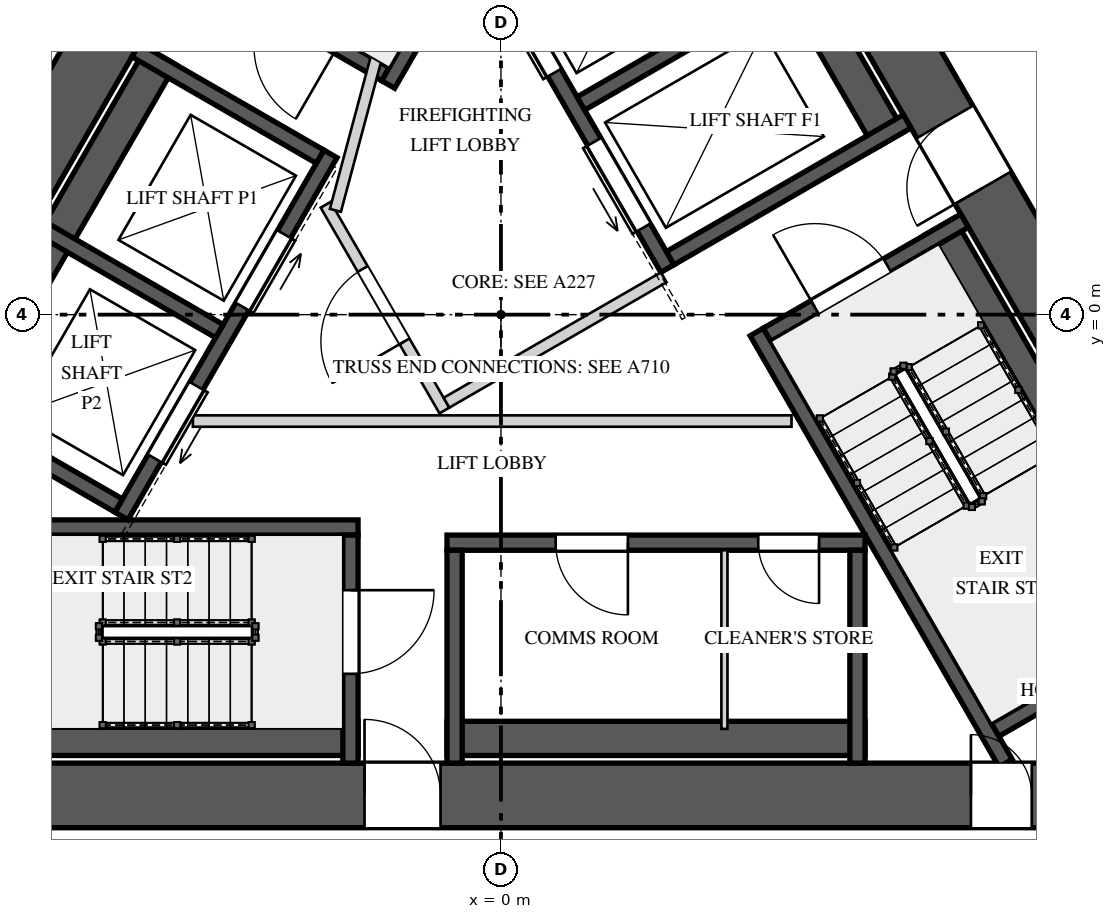
"""IFC4 building model, lengths in metres.
Left out: names, types, materials, properties, quantities, classifications, styles, units other than length and angle.
Written with IfcOpenShell. Run it as: python <this file> out.ifc"""

import sys

from ifc_helpers import new_model, si_unit, direction, frame, frame_2d, origin, place, context, subcontext, project, spatial, rectangle, extrude, element, fill, save


model = new_model("IFC4")
c1 = context("Model", 3, precision=1e-05, world=origin(), true_north=direction((0.0, 1.0)))
c2 = subcontext(c1, "Body", "Model", "MODEL_VIEW")
j1 = project(units=[si_unit("LENGTHUNIT", "METRE"), si_unit("PLANEANGLEUNIT", "RADIAN")], contexts=[c1])
p1 = place(None, origin())
s1 = spatial("IfcSite", under=j1, at=p1, CompositionType="ELEMENT")
p2 = place(p1, origin())
s2 = spatial("IfcBuilding", under=s1, at=p2, CompositionType="ELEMENT")
p3 = place(p2, frame((0.0, 0.0, 194.8)))
s3 = spatial("IfcBuildingStorey", under=s2, at=p3, CompositionType="ELEMENT", Elevation=194.8)
p4 = place(p3, frame((-1.198, 10.575, 0.0), z_axis=(0.0, 0.0, 1.0), x_axis=(-0.499995289315, -0.866028123483, 0.0)))
e1 = element("IfcWall", 1, at=p4, inside=s3, PredefinedType="SHEAR", context=c2, shape_type="SweptSolid", body=[
    extrude(rectangle(XDim=17.118, YDim=0.85, at=frame_2d((8.559, 0.0))), origin(), (0.0, 0.0, 1.0), 5.2),
])
p5 = place(p4, frame((6.764, 0.0, 0.0)))
e2 = element("IfcOpeningElement", 2, at=p5, cuts=e1, PredefinedType="OPENING", context=c2, shape_type="SweptSolid", body=[
    extrude(rectangle(XDim=1.0, YDim=2.4, at=frame_2d((0.5, 1.2))), frame((0.0, 0.435, 0.0), z_axis=(0.0, -1.0, 0.0), x_axis=(1.0, 0.0, 0.0)), (0.0, 0.0, 1.0), 0.87),
])
p6 = place(p3, frame((-8.559, -6.325, 0.0), z_axis=(0.0, 0.0, 1.0), x_axis=(1.0, 0.0, 0.0)))
e3 = element("IfcWall", 3, at=p6, inside=s3, PredefinedType="SHEAR", context=c2, shape_type="SweptSolid", body=[
    extrude(rectangle(XDim=17.118, YDim=0.85, at=frame_2d((8.559, 0.0))), origin(), (0.0, 0.0, 1.0), 5.2),
])
p7 = place(p6, frame((6.764, 0.0, 0.0)))
e4 = element("IfcOpeningElement", 4, at=p7, cuts=e3, PredefinedType="OPENING", context=c2, shape_type="SweptSolid", body=[
    extrude(rectangle(XDim=1.0, YDim=2.4, at=frame_2d((0.5, 1.2))), frame((0.0, 0.435, 0.0), z_axis=(0.0, -1.0, 0.0), x_axis=(1.0, 0.0, 0.0)), (0.0, 0.0, 1.0), 0.87),
])
p8 = place(p6, frame((14.742, 0.0, 0.0)))
e5 = element("IfcOpeningElement", 5, at=p8, cuts=e3, PredefinedType="OPENING", context=c2, shape_type="SweptSolid", body=[
    extrude(rectangle(XDim=0.8, YDim=2.1, at=frame_2d((0.4, 1.05))), frame((0.0, 0.435, 0.0), z_axis=(0.0, -1.0, 0.0), x_axis=(1.0, 0.0, 0.0)), (0.0, 0.0, 1.0), 0.87),
])
p9 = place(p3, frame((9.757, -4.25, 0.0), z_axis=(0.0, 0.0, 1.0), x_axis=(-0.499995289315, 0.866028123483, 0.0)))
e6 = element("IfcWall", 6, at=p9, inside=s3, PredefinedType="SHEAR", context=c2, shape_type="SweptSolid", body=[
    extrude(rectangle(XDim=17.118, YDim=0.85, at=frame_2d((8.559, 0.0))), origin(), (0.0, 0.0, 1.0), 5.2),
])
p10 = place(p9, frame((6.834, 0.0, 0.0)))
e7 = element("IfcOpeningElement", 7, at=p10, cuts=e6, PredefinedType="OPENING", context=c2, shape_type="SweptSolid", body=[
    extrude(rectangle(XDim=1.0, YDim=2.4, at=frame_2d((0.5, 1.2))), frame((0.0, 0.435, 0.0), z_axis=(0.0, -1.0, 0.0), x_axis=(1.0, 0.0, 0.0)), (0.0, 0.0, 1.0), 0.87),
])
p11 = place(p9, frame((14.252, 0.0, 0.0)))
e8 = element("IfcOpeningElement", 8, at=p11, cuts=e6, PredefinedType="OPENING", context=c2, shape_type="SweptSolid", body=[
    extrude(rectangle(XDim=0.8, YDim=2.1, at=frame_2d((0.4, 1.05))), frame((0.0, 0.435, 0.0), z_axis=(0.0, -1.0, 0.0), x_axis=(1.0, 0.0, 0.0)), (0.0, 0.0, 1.0), 0.87),
])
p12 = place(p3, frame((1.79, 8.7, 0.0), z_axis=(0.0, 0.0, 1.0), x_axis=(-0.499999959354, -0.866025427251, 0.0)))
e9 = element("IfcWall", 9, at=p12, inside=s3, PredefinedType="SOLIDWALL", context=c2, shape_type="SweptSolid", body=[
    extrude(rectangle(XDim=6.549, YDim=0.2, at=frame_2d((3.275, 0.0))), origin(), (0.0, 0.0, 1.0), 4.85),
])
p13 = place(p3, frame((-1.521, 3.165, 0.0), z_axis=(0.0, 0.0, 1.0), x_axis=(-0.866031096941, 0.499990139034, 0.0)))
e10 = element("IfcWall", 10, at=p13, inside=s3, PredefinedType="SOLIDWALL", context=c2, shape_type="SweptSolid", body=[
    extrude(rectangle(XDim=3.0, YDim=0.2, at=frame_2d((1.5, 0.0))), origin(), (0.0, 0.0, 1.0), 4.85),
])
p14 = place(p13, frame((0.725, 0.0, 0.0)))
e11 = element("IfcOpeningElement", 11, at=p14, cuts=e10, PredefinedType="OPENING", context=c2, shape_type="SweptSolid", body=[
    extrude(rectangle(XDim=1.1, YDim=2.4, at=frame_2d((0.55, 1.2))), frame((0.0, 0.11, 0.0), z_axis=(0.0, -1.0, 0.0), x_axis=(1.0, 0.0, 0.0)), (0.0, 0.0, 1.0), 0.22),
])
p15 = place(p3, frame((-8.08, -5.575, 0.0), z_axis=(0.0, 0.0, 1.0), x_axis=(1.0, 0.0, 0.0)))
e12 = element("IfcWall", 12, at=p15, inside=s3, PredefinedType="SOLIDWALL", context=c2, shape_type="SweptSolid", body=[
    extrude(rectangle(XDim=6.2, YDim=0.45, at=frame_2d((3.1, 0.0))), origin(), (0.0, 0.0, 1.0), 4.85),
])
p16 = place(p3, frame((-8.429, -2.8, 0.0), z_axis=(0.0, 0.0, 1.0), x_axis=(1.0, 0.0, 0.0)))
e13 = element("IfcWall", 13, at=p16, inside=s3, PredefinedType="SOLIDWALL", context=c2, shape_type="SweptSolid", body=[
    extrude(rectangle(XDim=6.549, YDim=0.2, at=frame_2d((3.275, 0.0))), origin(), (0.0, 0.0, 1.0), 4.85),
])
p17 = place(p3, frame((-1.98, -2.9, 0.0), z_axis=(0.0, 0.0, 1.0), x_axis=(0.0, -1.0, 0.0)))
e14 = element("IfcWall", 14, at=p17, inside=s3, PredefinedType="SOLIDWALL", context=c2, shape_type="SweptSolid", body=[
    extrude(rectangle(XDim=3.0, YDim=0.2, at=frame_2d((1.5, 0.0))), origin(), (0.0, 0.0, 1.0), 4.85),
])
p18 = place(p17, frame((0.725, 0.0, 0.0)))
e15 = element("IfcOpeningElement", 15, at=p18, cuts=e14, PredefinedType="OPENING", context=c2, shape_type="SweptSolid", body=[
    extrude(rectangle(XDim=1.1, YDim=2.4, at=frame_2d((0.55, 1.2))), frame((0.0, 0.11, 0.0), z_axis=(0.0, -1.0, 0.0), x_axis=(1.0, 0.0, 0.0)), (0.0, 0.0, 1.0), 0.22),
])
p19 = place(p3, frame((8.868, -4.21, 0.0), z_axis=(0.0, 0.0, 1.0), x_axis=(-0.500009909098, 0.866019682689, 0.0)))
e16 = element("IfcWall", 16, at=p19, inside=s3, PredefinedType="SOLIDWALL", context=c2, shape_type="SweptSolid", body=[
    extrude(rectangle(XDim=6.2, YDim=0.45, at=frame_2d((3.1, 0.0))), origin(), (0.0, 0.0, 1.0), 4.85),
])
p20 = place(p3, frame((6.64, -5.9, 0.0), z_axis=(0.0, 0.0, 1.0), x_axis=(-0.499999959354, 0.866025427251, 0.0)))
e17 = element("IfcWall", 17, at=p20, inside=s3, PredefinedType="SOLIDWALL", context=c2, shape_type="SweptSolid", body=[
    extrude(rectangle(XDim=6.549, YDim=0.2, at=frame_2d((3.275, 0.0))), origin(), (0.0, 0.0, 1.0), 4.85),
])
p21 = place(p3, frame((6.501, -5.461, 0.0), z_axis=(0.0, 0.0, 1.0), x_axis=(0.866031096941, 0.499990139034, 0.0)))
e18 = element("IfcWall", 18, at=p21, inside=s3, PredefinedType="SOLIDWALL", context=c2, shape_type="SweptSolid", body=[
    extrude(rectangle(XDim=3.0, YDim=0.2, at=frame_2d((1.5, 0.0))), origin(), (0.0, 0.0, 1.0), 4.85),
])
p22 = place(p3, frame((3.501, -0.265, 0.0), z_axis=(0.0, 0.0, 1.0), x_axis=(0.866031096941, 0.499990139034, 0.0)))
e19 = element("IfcWall", 19, at=p22, inside=s3, PredefinedType="SOLIDWALL", context=c2, shape_type="SweptSolid", body=[
    extrude(rectangle(XDim=3.0, YDim=0.2, at=frame_2d((1.5, 0.0))), origin(), (0.0, 0.0, 1.0), 4.85),
])
p23 = place(p22, frame((0.725, 0.0, 0.0)))
e20 = element("IfcOpeningElement", 20, at=p23, cuts=e19, PredefinedType="OPENING", context=c2, shape_type="SweptSolid", body=[
    extrude(rectangle(XDim=1.1, YDim=2.4, at=frame_2d((0.55, 1.2))), frame((0.0, 0.11, 0.0), z_axis=(0.0, -1.0, 0.0), x_axis=(1.0, 0.0, 0.0)), (0.0, 0.0, 1.0), 0.22),
])
p24 = place(p3, frame((-2.243, 2.115, 0.0), z_axis=(0.0, 0.0, 1.0), x_axis=(-0.499996545922, -0.866027397988, 0.0)))
e21 = element("IfcWall", 21, at=p24, inside=s3, PredefinedType="SOLIDWALL", context=c2, shape_type="SweptSolid", body=[
    extrude(rectangle(XDim=5.5, YDim=0.2, at=frame_2d((2.75, 0.0))), origin(), (0.0, 0.0, 1.0), 4.85),
])
p25 = place(p24, frame((1.22, 0.0, 0.0)))
e22 = element("IfcOpeningElement", 22, at=p25, cuts=e21, PredefinedType="OPENING", context=c2, shape_type="SweptSolid", body=[
    extrude(rectangle(XDim=1.1, YDim=2.1, at=frame_2d((0.55, 1.05))), frame((0.0, 0.11, 0.0), z_axis=(0.0, -1.0, 0.0), x_axis=(1.0, 0.0, 0.0)), (0.0, 0.0, 1.0), 0.22),
])
p26 = place(p24, frame((3.525, 0.0, 0.0)))
e23 = element("IfcOpeningElement", 23, at=p26, cuts=e21, PredefinedType="OPENING", context=c2, shape_type="SweptSolid", body=[
    extrude(rectangle(XDim=1.1, YDim=2.1, at=frame_2d((0.55, 1.05))), frame((0.0, 0.11, 0.0), z_axis=(0.0, -1.0, 0.0), x_axis=(1.0, 0.0, 0.0)), (0.0, 0.0, 1.0), 0.22),
])
p27 = place(p3, frame((-4.473, 3.402, 0.0), z_axis=(0.0, 0.0, 1.0), x_axis=(-0.499996545922, -0.866027397988, 0.0)))
e24 = element("IfcWall", 24, at=p27, inside=s3, PredefinedType="SOLIDWALL", context=c2, shape_type="SweptSolid", body=[
    extrude(rectangle(XDim=5.5, YDim=0.45, at=frame_2d((2.75, 0.0))), origin(), (0.0, 0.0, 1.0), 4.85),
])
p28 = place(p3, frame((-2.38, 2.078, 0.0), z_axis=(0.0, 0.0, 1.0), x_axis=(-0.866034573852, 0.49998411664, 0.0)))
e25 = element("IfcWall", 25, at=p28, inside=s3, PredefinedType="SOLIDWALL", context=c2, shape_type="SweptSolid", body=[
    extrude(rectangle(XDim=2.8, YDim=0.2, at=frame_2d((1.4, 0.0))), origin(), (0.0, 0.0, 1.0), 4.85),
])
p29 = place(p3, frame((-3.705, -0.217, 0.0), z_axis=(0.0, 0.0, 1.0), x_axis=(-0.866018616679, 0.500011755427, 0.0)))
e26 = element("IfcWall", 26, at=p29, inside=s3, PredefinedType="SOLIDWALL", context=c2, shape_type="SweptSolid", body=[
    extrude(rectangle(XDim=2.8, YDim=0.2, at=frame_2d((1.4, 0.0))), origin(), (0.0, 0.0, 1.0), 4.85),
])
p30 = place(p3, frame((-5.03, -2.512, 0.0), z_axis=(0.0, 0.0, 1.0), x_axis=(-0.865996816683, 0.500049511043, 0.0)))
e27 = element("IfcWall", 27, at=p30, inside=s3, PredefinedType="SOLIDWALL", context=c2, shape_type="SweptSolid", body=[
    extrude(rectangle(XDim=2.8, YDim=0.2, at=frame_2d((1.4, 0.0))), origin(), (0.0, 0.0, 1.0), 4.85),
])
p31 = place(p3, frame((4.79, -3.0, 0.0), z_axis=(0.0, 0.0, 1.0), x_axis=(-1.0, 0.0, 0.0)))
e28 = element("IfcWall", 28, at=p31, inside=s3, PredefinedType="SOLIDWALL", context=c2, shape_type="SweptSolid", body=[
    extrude(rectangle(XDim=5.5, YDim=0.2, at=frame_2d((2.75, 0.0))), origin(), (0.0, 0.0, 1.0), 4.85),
])
p32 = place(p31, frame((3.12, 0.0, 0.0)))
e29 = element("IfcOpeningElement", 29, at=p32, cuts=e28, PredefinedType="OPENING", context=c2, shape_type="SweptSolid", body=[
    extrude(rectangle(XDim=0.95, YDim=2.4, at=frame_2d((0.475, 1.2))), frame((0.0, 0.11, 0.0), z_axis=(0.0, -1.0, 0.0), x_axis=(1.0, 0.0, 0.0)), (0.0, 0.0, 1.0), 0.22),
])
p33 = place(p31, frame((0.605, 0.0, 0.0)))
e30 = element("IfcOpeningElement", 30, at=p33, cuts=e28, PredefinedType="OPENING", context=c2, shape_type="SweptSolid", body=[
    extrude(rectangle(XDim=0.8, YDim=2.1, at=frame_2d((0.4, 1.05))), frame((0.0, 0.11, 0.0), z_axis=(0.0, -1.0, 0.0), x_axis=(1.0, 0.0, 0.0)), (0.0, 0.0, 1.0), 0.22),
])
p34 = place(p3, frame((-0.71, -5.575, 0.0), z_axis=(0.0, 0.0, 1.0), x_axis=(1.0, 0.0, 0.0)))
e31 = element("IfcWall", 31, at=p34, inside=s3, PredefinedType="SOLIDWALL", context=c2, shape_type="SweptSolid", body=[
    extrude(rectangle(XDim=5.5, YDim=0.45, at=frame_2d((2.75, 0.0))), origin(), (0.0, 0.0, 1.0), 4.85),
])
for number, where, z_axis, x_axis in (
    (32, (-0.61, -3.1, 0.0), (0.0, 0.0, 1.0), (0.0, -1.0, 0.0)),
    (33, (4.69, -3.1, 0.0), (0.0, 0.0, 1.0), (0.0, -1.0, 0.0)),
):
    element("IfcWall", number, at=place(p3, frame(where, z_axis=z_axis, x_axis=x_axis)), inside=s3, PredefinedType="SOLIDWALL", context=c2, shape_type="SweptSolid", body=[
        extrude(rectangle(XDim=2.8, YDim=0.2, at=frame_2d((1.4, 0.0))), origin(), (0.0, 0.0, 1.0), 4.85),
    ])
p35 = place(p3, frame((2.94, -3.1, 0.0), z_axis=(0.0, 0.0, 1.0), x_axis=(0.0, -1.0, 0.0)))
e34 = element("IfcWall", 34, at=p35, inside=s3, PredefinedType="PARTITIONING", context=c2, shape_type="SweptSolid", body=[
    extrude(rectangle(XDim=2.35, YDim=0.08, at=frame_2d((1.175, 0.0))), origin(), (0.0, 0.0, 1.0), 4.85),
])
p36 = place(p3, frame((2.19, 0.606, 0.0), z_axis=(0.0, 0.0, 1.0), x_axis=(-0.500002801628, 0.866023786258, 0.0)))
e35 = element("IfcWall", 35, at=p36, inside=s3, PredefinedType="SOLIDWALL", context=c2, shape_type="SweptSolid", body=[
    extrude(rectangle(XDim=4.9, YDim=0.2, at=frame_2d((2.45, 0.0))), origin(), (0.0, 0.0, 1.0), 4.85),
])
p37 = place(p36, frame((0.625, 0.0, 0.0)))
e36 = element("IfcOpeningElement", 36, at=p37, cuts=e35, PredefinedType="OPENING", context=c2, shape_type="SweptSolid", body=[
    extrude(rectangle(XDim=1.3, YDim=2.1, at=frame_2d((0.65, 1.05))), frame((0.0, 0.11, 0.0), z_axis=(0.0, -1.0, 0.0), x_axis=(1.0, 0.0, 0.0)), (0.0, 0.0, 1.0), 0.22),
])
p38 = place(p36, frame((2.975, 0.0, 0.0)))
e37 = element("IfcOpeningElement", 37, at=p38, cuts=e35, PredefinedType="OPENING", context=c2, shape_type="SweptSolid", body=[
    extrude(rectangle(XDim=1.3, YDim=2.1, at=frame_2d((0.65, 1.05))), frame((0.0, 0.11, 0.0), z_axis=(0.0, -1.0, 0.0), x_axis=(1.0, 0.0, 0.0)), (0.0, 0.0, 1.0), 0.22),
])
p39 = place(p3, frame((5.113, 2.294, 0.0), z_axis=(0.0, 0.0, 1.0), x_axis=(-0.500002801628, 0.866023786258, 0.0)))
e38 = element("IfcWall", 38, at=p39, inside=s3, PredefinedType="SOLIDWALL", context=c2, shape_type="SweptSolid", body=[
    extrude(rectangle(XDim=4.9, YDim=0.45, at=frame_2d((2.45, 0.0))), origin(), (0.0, 0.0, 1.0), 4.85),
])
for number, where, z_axis, x_axis in (
    (39, (2.227, 0.743, 0.0), (0.0, 0.0, 1.0), (0.866, 0.5, 0.0)),
    (40, (1.052, 2.778, 0.0), (0.0, 0.0, 1.0), (0.866, 0.5, 0.0)),
):
    element("IfcWall", number, at=place(p3, frame(where, z_axis=z_axis, x_axis=x_axis)), inside=s3, PredefinedType="SOLIDWALL", context=c2, shape_type="SweptSolid", body=[
        extrude(rectangle(XDim=3.6, YDim=0.2, at=frame_2d((1.8, 0.0))), origin(), (0.0, 0.0, 1.0), 4.85),
    ])
p40 = place(p3, frame((-0.744, -1.261, 0.0), z_axis=(0.0, 0.0, 1.0), x_axis=(-0.500004234368, 0.866022959057, 0.0)))
e41 = element("IfcWall", 41, at=p40, inside=s3, PredefinedType="PARTITIONING", context=c2, shape_type="SweptSolid", body=[
    extrude(rectangle(XDim=3.125, YDim=0.15, at=frame_2d((1.562, 0.0))), origin(), (0.0, 0.0, 1.0), 4.85),
])
p41 = place(p40, frame((1.05, 0.0, 0.0)))
e42 = element("IfcOpeningElement", 42, at=p41, cuts=e41, PredefinedType="OPENING", context=c2, shape_type="SweptSolid", body=[
    extrude(rectangle(XDim=1.1, YDim=2.4, at=frame_2d((0.55, 1.2))), frame((0.0, 0.085, 0.0), z_axis=(0.0, -1.0, 0.0), x_axis=(1.0, 0.0, 0.0)), (0.0, 0.0, 1.0), 0.17),
])
p42 = place(p3, frame((-0.717, -1.159, 0.0), z_axis=(0.0, 0.0, 1.0), x_axis=(0.866008176907, 0.50002983664, 0.0)))
e43 = element("IfcWall", 43, at=p42, inside=s3, PredefinedType="PARTITIONING", context=c2, shape_type="SweptSolid", body=[
    extrude(rectangle(XDim=3.3, YDim=0.15, at=frame_2d((1.65, 0.0))), origin(), (0.0, 0.0, 1.0), 4.85),
])
p43 = place(p3, frame((-2.178, 1.372, 0.0), z_axis=(0.0, 0.0, 1.0), x_axis=(0.258808958833, 0.96592852884, 0.0)))
e44 = element("IfcWall", 44, at=p43, inside=s3, PredefinedType="PARTITIONING", context=c2, shape_type="SweptSolid", body=[
    extrude(rectangle(XDim=2.903, YDim=0.15, at=frame_2d((1.451, 0.0))), origin(), (0.0, 0.0, 1.0), 4.85),
])
p44 = place(p3, frame((-4.053, -1.4, 0.0), z_axis=(0.0, 0.0, 1.0), x_axis=(1.0, 0.0, 0.0)))
e45 = element("IfcWall", 45, at=p44, inside=s3, PredefinedType="PARTITIONING", context=c2, shape_type="SweptSolid", body=[
    extrude(rectangle(XDim=7.876, YDim=0.15, at=frame_2d((3.938, 0.0))), origin(), (0.0, 0.0, 1.0), 4.85),
])
p45 = place(p18, origin())
e46 = element("IfcDoor", 46, at=p45, inside=s3, OperationType="SINGLE_SWING_LEFT", PredefinedType="DOOR", context=c2, shape_type="SweptSolid", body=[
    extrude(rectangle(XDim=1.1, YDim=2.4, at=frame_2d((0.55, 1.2))), frame((0.0, 0.025, 0.0), z_axis=(0.0, -1.0, 0.0), x_axis=(1.0, 0.0, 0.0)), (0.0, 0.0, 1.0), 0.05),
])
fill(e15, e46)
p46 = place(p23, origin())
e47 = element("IfcDoor", 47, at=p46, inside=s3, OperationType="SINGLE_SWING_RIGHT", PredefinedType="DOOR", context=c2, shape_type="SweptSolid", body=[
    extrude(rectangle(XDim=1.1, YDim=2.4, at=frame_2d((0.55, 1.2))), frame((0.0, 0.025, 0.0), z_axis=(0.0, -1.0, 0.0), x_axis=(1.0, 0.0, 0.0)), (0.0, 0.0, 1.0), 0.05),
])
fill(e20, e47)
p47 = place(p25, origin())
e48 = element("IfcDoor", 48, at=p47, inside=s3, OperationType="SLIDING_TO_LEFT", PredefinedType="DOOR", context=c2, shape_type="SweptSolid", body=[
    extrude(rectangle(XDim=1.1, YDim=2.1, at=frame_2d((0.55, 1.05))), frame((0.0, 0.025, 0.0), z_axis=(0.0, -1.0, 0.0), x_axis=(1.0, 0.0, 0.0)), (0.0, 0.0, 1.0), 0.05),
])
fill(e22, e48)
p48 = place(p26, origin())
e49 = element("IfcDoor", 49, at=p48, inside=s3, OperationType="SLIDING_TO_RIGHT", PredefinedType="DOOR", context=c2, shape_type="SweptSolid", body=[
    extrude(rectangle(XDim=1.1, YDim=2.1, at=frame_2d((0.55, 1.05))), frame((0.0, 0.025, 0.0), z_axis=(0.0, -1.0, 0.0), x_axis=(1.0, 0.0, 0.0)), (0.0, 0.0, 1.0), 0.05),
])
fill(e23, e49)
p49 = place(p32, origin())
e50 = element("IfcDoor", 50, at=p49, inside=s3, OperationType="SINGLE_SWING_LEFT", PredefinedType="DOOR", context=c2, shape_type="SweptSolid", body=[
    extrude(rectangle(XDim=0.95, YDim=2.4, at=frame_2d((0.475, 1.2))), frame((0.0, 0.025, 0.0), z_axis=(0.0, -1.0, 0.0), x_axis=(1.0, 0.0, 0.0)), (0.0, 0.0, 1.0), 0.05),
])
fill(e29, e50)
p50 = place(p33, origin())
e51 = element("IfcDoor", 51, at=p50, inside=s3, OperationType="SINGLE_SWING_RIGHT", PredefinedType="DOOR", context=c2, shape_type="SweptSolid", body=[
    extrude(rectangle(XDim=0.8, YDim=2.1, at=frame_2d((0.4, 1.05))), frame((0.0, 0.025, 0.0), z_axis=(0.0, -1.0, 0.0), x_axis=(1.0, 0.0, 0.0)), (0.0, 0.0, 1.0), 0.05),
])
fill(e30, e51)
p51 = place(p37, origin())
e52 = element("IfcDoor", 52, at=p51, inside=s3, OperationType="SLIDING_TO_LEFT", PredefinedType="DOOR", context=c2, shape_type="SweptSolid", body=[
    extrude(rectangle(XDim=1.3, YDim=2.1, at=frame_2d((0.65, 1.05))), frame((0.0, 0.025, 0.0), z_axis=(0.0, -1.0, 0.0), x_axis=(1.0, 0.0, 0.0)), (0.0, 0.0, 1.0), 0.05),
])
fill(e36, e52)
p52 = place(p38, origin())
e53 = element("IfcDoor", 53, at=p52, inside=s3, OperationType="SLIDING_TO_RIGHT", PredefinedType="DOOR", context=c2, shape_type="SweptSolid", body=[
    extrude(rectangle(XDim=1.3, YDim=2.1, at=frame_2d((0.65, 1.05))), frame((0.0, 0.025, 0.0), z_axis=(0.0, -1.0, 0.0), x_axis=(1.0, 0.0, 0.0)), (0.0, 0.0, 1.0), 0.05),
])
fill(e37, e53)
p53 = place(p41, origin())
e54 = element("IfcDoor", 54, at=p53, inside=s3, OperationType="SINGLE_SWING_LEFT", PredefinedType="DOOR", context=c2, shape_type="SweptSolid", body=[
    extrude(rectangle(XDim=1.1, YDim=2.4, at=frame_2d((0.55, 1.2))), frame((0.0, 0.025, 0.0), z_axis=(0.0, -1.0, 0.0), x_axis=(1.0, 0.0, 0.0)), (0.0, 0.0, 1.0), 0.05),
])
fill(e42, e54)
p54 = place(p7, origin())
e55 = element("IfcDoor", 55, at=p54, inside=s3, OperationType="SINGLE_SWING_LEFT", PredefinedType="DOOR", context=c2, shape_type="SweptSolid", body=[
    extrude(rectangle(XDim=1.0, YDim=2.4, at=frame_2d((0.5, 1.2))), frame((0.0, 0.025, 0.0), z_axis=(0.0, -1.0, 0.0), x_axis=(1.0, 0.0, 0.0)), (0.0, 0.0, 1.0), 0.05),
])
fill(e4, e55)
p55 = place(p10, origin())
e56 = element("IfcDoor", 56, at=p55, inside=s3, OperationType="SINGLE_SWING_RIGHT", PredefinedType="DOOR", context=c2, shape_type="SweptSolid", body=[
    extrude(rectangle(XDim=1.0, YDim=2.4, at=frame_2d((0.5, 1.2))), frame((0.0, 0.025, 0.0), z_axis=(0.0, -1.0, 0.0), x_axis=(1.0, 0.0, 0.0)), (0.0, 0.0, 1.0), 0.05),
])
fill(e7, e56)
p56 = place(p8, origin())
e57 = element("IfcDoor", 57, at=p56, inside=s3, OperationType="SINGLE_SWING_LEFT", PredefinedType="DOOR", context=c2, shape_type="SweptSolid", body=[
    extrude(rectangle(XDim=0.8, YDim=2.1, at=frame_2d((0.4, 1.05))), frame((0.0, 0.025, 0.0), z_axis=(0.0, -1.0, 0.0), x_axis=(1.0, 0.0, 0.0)), (0.0, 0.0, 1.0), 0.05),
])
fill(e5, e57)
save(model, sys.argv[1])
